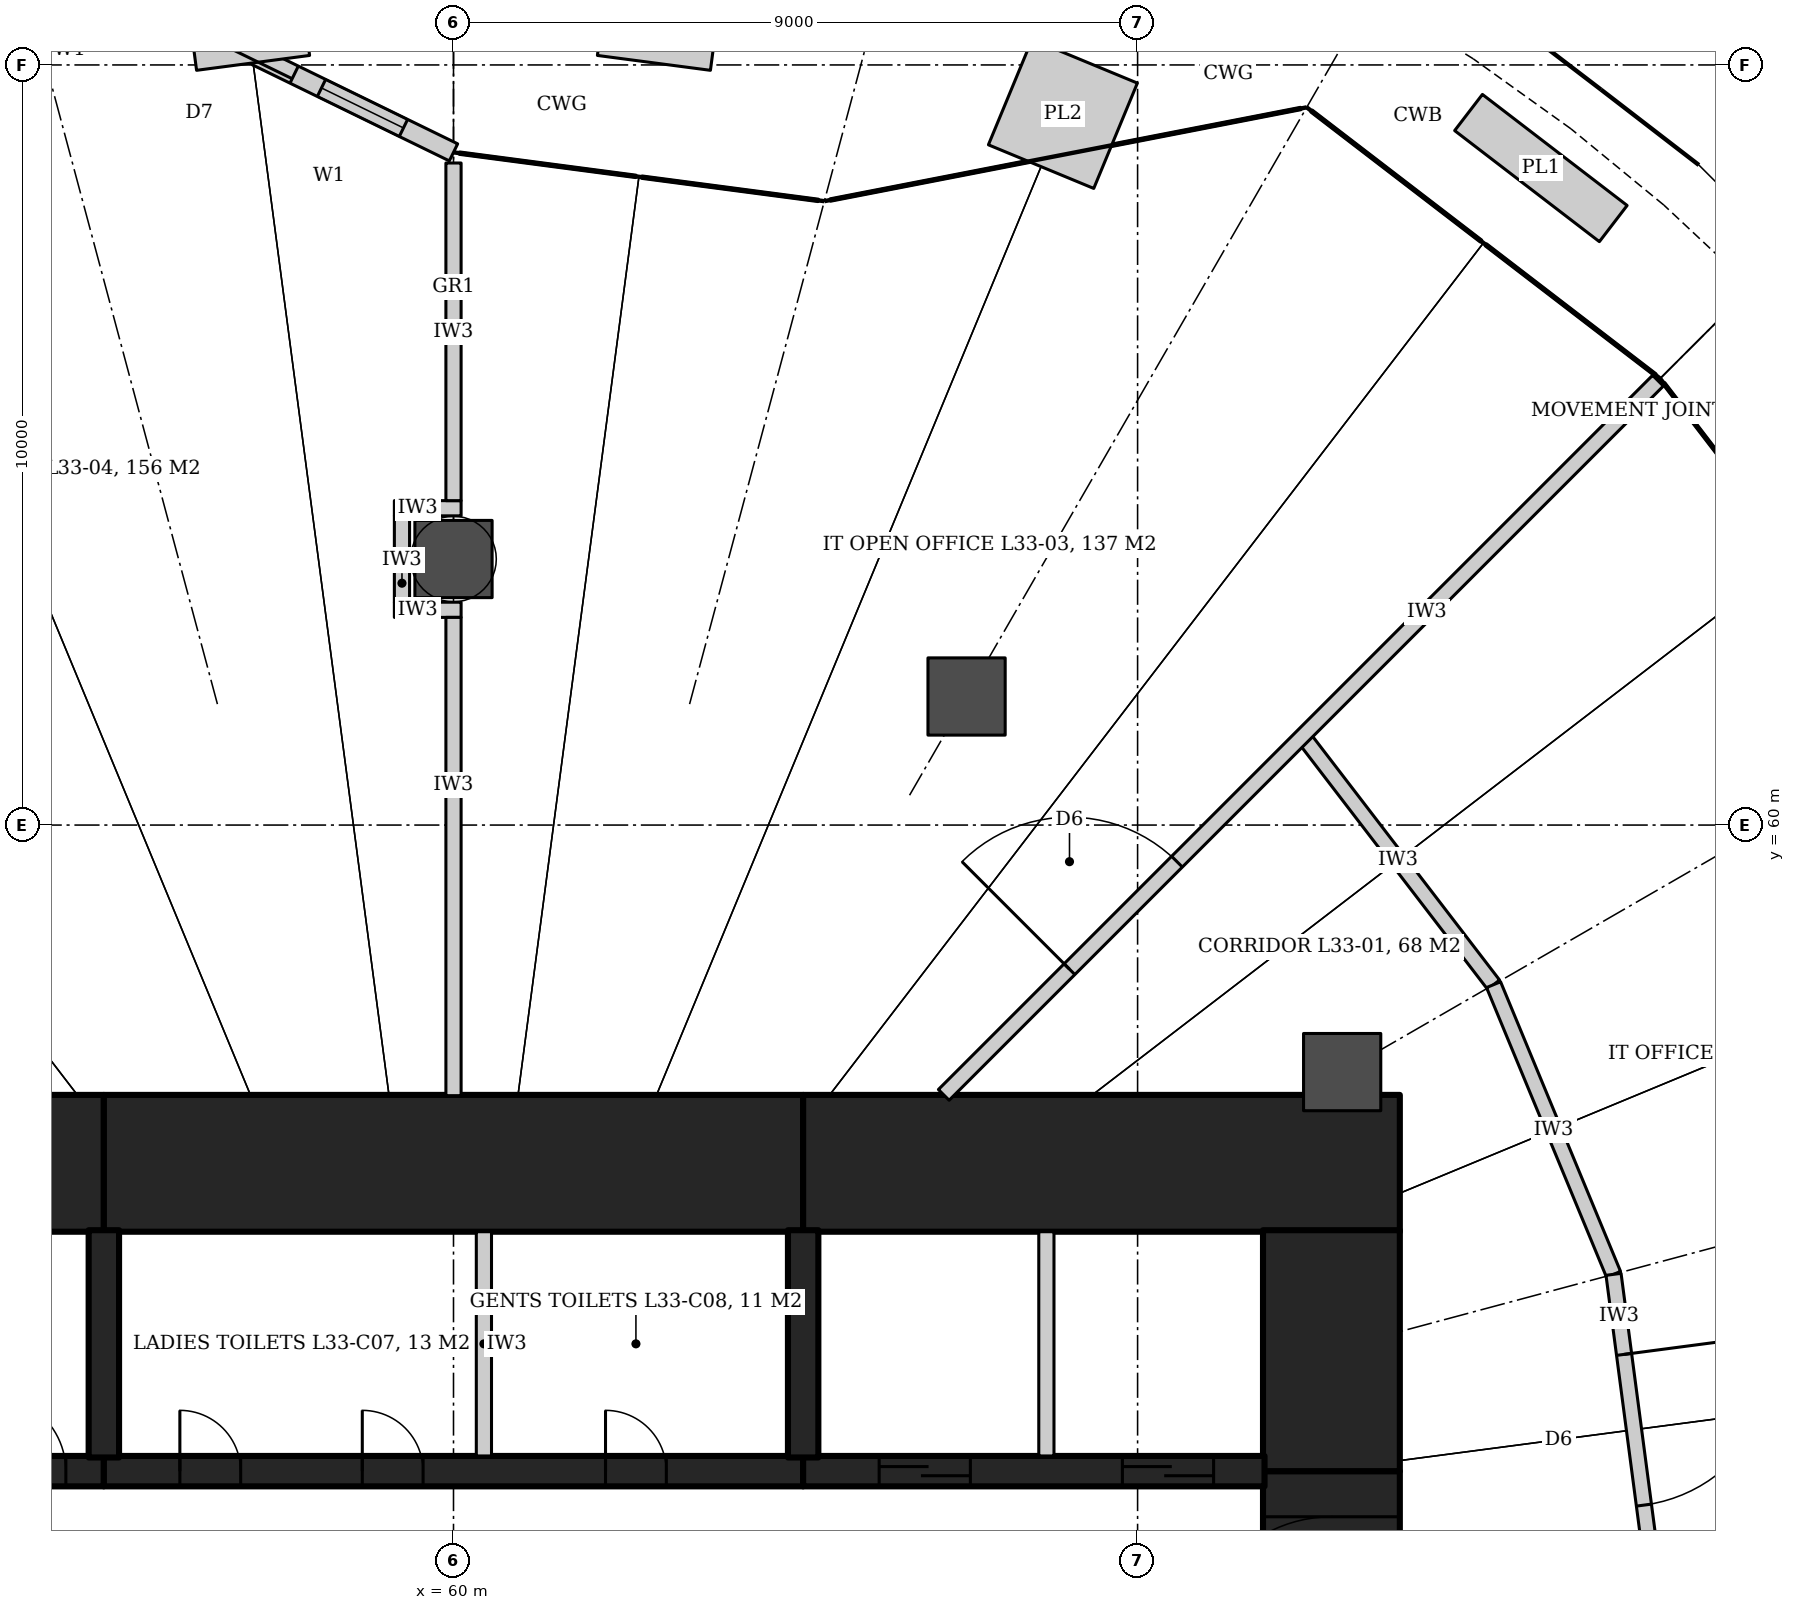
"""IFC4 building model, lengths in metres.
Left out: names, types, materials, properties, quantities, classifications, styles, units other than length and angle.
Written with IfcOpenShell. Run it as: python <this file> out.ifc"""

import sys

from ifc_helpers import new_model, si_unit, direction, frame, frame_2d, origin, origin_2d, place, context, subcontext, project, spatial, rectangle, hollow_circle, extrude, element, fill, save


model = new_model("IFC4")
c1 = context("Model", 3, precision=1e-05, world=origin(), true_north=direction((0.0, 1.0)))
c2 = subcontext(c1, "Body", "Model", "MODEL_VIEW")
j1 = project(units=[si_unit("LENGTHUNIT", "METRE"), si_unit("PLANEANGLEUNIT", "RADIAN")], contexts=[c1])
p1 = place(None, origin())
s1 = spatial("IfcSite", under=j1, at=p1, CompositionType="ELEMENT")
p2 = place(p1, origin())
s2 = spatial("IfcBuilding", under=s1, at=p2, CompositionType="ELEMENT")
p3 = place(p2, frame((0.0, 0.0, 147.8)))
s3 = spatial("IfcBuildingStorey", under=s2, at=p3, CompositionType="ELEMENT", Elevation=147.8)
p4 = place(p3, frame((47.55, 55.55, 0.0), z_axis=(0.0, 0.0, 1.0), x_axis=(1.0, 0.0, 0.0)))
e1 = element("IfcWall", 1, at=p4, inside=s3, PredefinedType="SHEAR", context=c2, shape_type="SweptSolid", body=[
    extrude(rectangle(XDim=7.85, YDim=1.8, at=frame_2d((3.925, 0.0))), origin(), (0.0, 0.0, 1.0), 4.2),
])
p5 = place(p3, frame((55.4, 55.55, 0.0), z_axis=(0.0, 0.0, 1.0), x_axis=(1.0, 0.0, 0.0)))
e2 = element("IfcWall", 2, at=p5, inside=s3, PredefinedType="SHEAR", context=c2, shape_type="SweptSolid", body=[
    extrude(rectangle(XDim=9.2, YDim=1.8, at=frame_2d((4.6, 0.0))), origin(), (0.0, 0.0, 1.0), 4.2),
])
p6 = place(p3, frame((64.6, 55.55, 0.0), z_axis=(0.0, 0.0, 1.0), x_axis=(1.0, 0.0, 0.0)))
e3 = element("IfcWall", 3, at=p6, inside=s3, PredefinedType="SHEAR", context=c2, shape_type="SweptSolid", body=[
    extrude(rectangle(XDim=7.85, YDim=1.8, at=frame_2d((3.925, 0.0))), origin(), (0.0, 0.0, 1.0), 4.2),
])
p7 = place(p3, frame((71.55, 48.5, 0.0), z_axis=(0.0, 0.0, 1.0), x_axis=(0.0, 1.0, 0.0)))
e4 = element("IfcWall", 4, at=p7, inside=s3, PredefinedType="SHEAR", context=c2, shape_type="SweptSolid", body=[
    extrude(rectangle(XDim=3.0, YDim=1.8, at=frame_2d((1.5, 0.0))), origin(), (0.0, 0.0, 1.0), 4.2),
])
p8 = place(p7, frame((0.6, 0.0, 0.0)))
e5 = element("IfcOpeningElement", 5, at=p8, cuts=e4, PredefinedType="OPENING", context=c2, shape_type="SweptSolid", body=[
    extrude(rectangle(XDim=1.8, YDim=2.1, at=frame_2d((0.9, 1.05))), frame((0.0, 0.91, 0.0), z_axis=(0.0, -1.0, 0.0), x_axis=(1.0, 0.0, 0.0)), (0.0, 0.0, 1.0), 1.82),
])
p9 = place(p3, frame((71.55, 51.5, 0.0), z_axis=(0.0, 0.0, 1.0), x_axis=(0.0, 1.0, 0.0)))
e6 = element("IfcWall", 6, at=p9, inside=s3, PredefinedType="SHEAR", context=c2, shape_type="SweptSolid", body=[
    extrude(rectangle(XDim=3.17, YDim=1.8, at=frame_2d((1.585, 0.0))), origin(), (0.0, 0.0, 1.0), 4.2),
])
p10 = place(p3, frame((49.33, 51.5, 0.0), z_axis=(0.0, 0.0, 1.0), x_axis=(1.0, 0.0, 0.0)))
e7 = element("IfcWall", 7, at=p10, inside=s3, PredefinedType="SHEAR", context=c2, shape_type="SweptSolid", body=[
    extrude(rectangle(XDim=6.07, YDim=0.4, at=frame_2d((3.035, 0.0))), origin(), (0.0, 0.0, 1.0), 4.2),
])
p11 = place(p10, frame((4.57, 0.0, 0.0)))
e8 = element("IfcOpeningElement", 8, at=p11, cuts=e7, PredefinedType="OPENING", context=c2, shape_type="SweptSolid", body=[
    extrude(rectangle(XDim=1.0, YDim=2.1, at=frame_2d((0.5, 1.05))), frame((0.0, 0.21, 0.0), z_axis=(0.0, -1.0, 0.0), x_axis=(1.0, 0.0, 0.0)), (0.0, 0.0, 1.0), 0.42),
])
p12 = place(p3, frame((55.4, 51.5, 0.0), z_axis=(0.0, 0.0, 1.0), x_axis=(1.0, 0.0, 0.0)))
e9 = element("IfcWall", 9, at=p12, inside=s3, PredefinedType="SHEAR", context=c2, shape_type="SweptSolid", body=[
    extrude(rectangle(XDim=9.2, YDim=0.4, at=frame_2d((4.6, 0.0))), origin(), (0.0, 0.0, 1.0), 4.2),
])
p13 = place(p12, frame((1.0, 0.0, 0.0)))
e10 = element("IfcOpeningElement", 10, at=p13, cuts=e9, PredefinedType="OPENING", context=c2, shape_type="SweptSolid", body=[
    extrude(rectangle(XDim=0.8, YDim=2.1, at=frame_2d((0.4, 1.05))), frame((0.0, 0.21, 0.0), z_axis=(0.0, -1.0, 0.0), x_axis=(1.0, 0.0, 0.0)), (0.0, 0.0, 1.0), 0.42),
])
p14 = place(p12, frame((3.4, 0.0, 0.0)))
e11 = element("IfcOpeningElement", 11, at=p14, cuts=e9, PredefinedType="OPENING", context=c2, shape_type="SweptSolid", body=[
    extrude(rectangle(XDim=0.8, YDim=2.1, at=frame_2d((0.4, 1.05))), frame((0.0, 0.21, 0.0), z_axis=(0.0, -1.0, 0.0), x_axis=(1.0, 0.0, 0.0)), (0.0, 0.0, 1.0), 0.42),
])
p15 = place(p12, frame((6.6, 0.0, 0.0)))
e12 = element("IfcOpeningElement", 12, at=p15, cuts=e9, PredefinedType="OPENING", context=c2, shape_type="SweptSolid", body=[
    extrude(rectangle(XDim=0.8, YDim=2.1, at=frame_2d((0.4, 1.05))), frame((0.0, 0.21, 0.0), z_axis=(0.0, -1.0, 0.0), x_axis=(1.0, 0.0, 0.0)), (0.0, 0.0, 1.0), 0.42),
])
p16 = place(p3, frame((64.6, 51.5, 0.0), z_axis=(0.0, 0.0, 1.0), x_axis=(1.0, 0.0, 0.0)))
e13 = element("IfcWall", 13, at=p16, inside=s3, PredefinedType="SHEAR", context=c2, shape_type="SweptSolid", body=[
    extrude(rectangle(XDim=6.07, YDim=0.4, at=frame_2d((3.035, 0.0))), origin(), (0.0, 0.0, 1.0), 4.2),
])
p17 = place(p16, frame((1.0, 0.0, 0.0)))
e14 = element("IfcOpeningElement", 14, at=p17, cuts=e13, PredefinedType="OPENING", context=c2, shape_type="SweptSolid", body=[
    extrude(rectangle(XDim=1.2, YDim=2.1, at=frame_2d((0.6, 1.05))), frame((0.0, 0.21, 0.0), z_axis=(0.0, -1.0, 0.0), x_axis=(1.0, 0.0, 0.0)), (0.0, 0.0, 1.0), 0.42),
])
p18 = place(p16, frame((4.2, 0.0, 0.0)))
e15 = element("IfcOpeningElement", 15, at=p18, cuts=e13, PredefinedType="OPENING", context=c2, shape_type="SweptSolid", body=[
    extrude(rectangle(XDim=1.2, YDim=2.1, at=frame_2d((0.6, 1.05))), frame((0.0, 0.21, 0.0), z_axis=(0.0, -1.0, 0.0), x_axis=(1.0, 0.0, 0.0)), (0.0, 0.0, 1.0), 0.42),
])
for number, where, z_axis, x_axis in (
    (16, (55.4, 51.68, 0.0), (0.0, 0.0, 1.0), (0.0, 1.0, 0.0)),
    (17, (64.6, 51.68, 0.0), (0.0, 0.0, 1.0), (0.0, 1.0, 0.0)),
):
    element("IfcWall", number, at=place(p3, frame(where, z_axis=z_axis, x_axis=x_axis)), inside=s3, PredefinedType="SHEAR", context=c2, shape_type="SweptSolid", body=[
        extrude(rectangle(XDim=2.99, YDim=0.4, at=frame_2d((1.495, 0.0))), origin(), (0.0, 0.0, 1.0), 4.2),
    ])
for number, where, z_axis, x_axis in (
    (18, (71.691, 56.75, 0.0), (0.0, 0.0, 1.0), (1.0, 0.0, 0.0)),
    (19, (66.75, 61.691, 0.0), (0.0, 0.0, 1.0), (1.0, 0.0, 0.0)),
    (20, (60.0, 63.5, 0.0), (0.0, 0.0, 1.0), (1.0, 0.0, 0.0)),
):
    element("IfcColumn", number, at=place(p3, frame(where, z_axis=z_axis, x_axis=x_axis)), inside=s3, PredefinedType="COLUMN", context=c2, shape_type="SweptSolid", body=[
        extrude(hollow_circle(Radius=0.508, WallThickness=0.05, at=origin_2d()), origin(), (0.0, 0.0, 1.0), 4.2),
    ])
p19 = place(p3, frame((71.172, 61.172, 0.0), z_axis=(0.0, 0.0, 1.0), x_axis=(0.608714823874, -0.793389099494, 0.0)))
e21 = element("IfcWall", 21, at=p19, inside=s3, PredefinedType="PARTITIONING", context=c2, shape_type="SweptSolid", body=[
    extrude(rectangle(XDim=4.125, YDim=0.2, at=frame_2d((2.062, 0.0))), origin(), (0.0, 0.0, 1.0), 3.04),
])
p20 = place(p3, frame((73.683, 57.9, 0.0), z_axis=(0.0, 0.0, 1.0), x_axis=(0.382731667114, -0.923859551549, 0.0)))
e22 = element("IfcWall", 22, at=p20, inside=s3, PredefinedType="PARTITIONING", context=c2, shape_type="SweptSolid", body=[
    extrude(rectangle(XDim=4.125, YDim=0.2, at=frame_2d((2.062, 0.0))), origin(), (0.0, 0.0, 1.0), 3.04),
])
p21 = place(p3, frame((75.262, 54.089, 0.0), z_axis=(0.0, 0.0, 1.0), x_axis=(0.130515758099, -0.991446234996, 0.0)))
e23 = element("IfcWall", 23, at=p21, inside=s3, PredefinedType="PARTITIONING", context=c2, shape_type="SweptSolid", body=[
    extrude(rectangle(XDim=4.125, YDim=0.2, at=frame_2d((2.062, 0.0))), origin(), (0.0, 0.0, 1.0), 3.04),
])
p22 = place(p21, frame((1.062, 0.0, 0.0)))
e24 = element("IfcOpeningElement", 24, at=p22, cuts=e23, PredefinedType="OPENING", context=c2, shape_type="SweptSolid", body=[
    extrude(rectangle(XDim=2.0, YDim=2.1, at=frame_2d((1.0, 1.05))), frame((0.0, 0.11, 0.0), z_axis=(0.0, -1.0, 0.0), x_axis=(1.0, 0.0, 0.0)), (0.0, 0.0, 1.0), 0.22),
])
p23 = place(p3, frame((66.45, 56.45, 0.0), z_axis=(0.0, 0.0, 1.0), x_axis=(0.707106781187, 0.707106781187, 0.0)))
e25 = element("IfcWall", 25, at=p23, inside=s3, PredefinedType="PARTITIONING", context=c2, shape_type="SweptSolid", body=[
    extrude(rectangle(XDim=13.288, YDim=0.2, at=frame_2d((6.644, 0.0))), origin(), (0.0, 0.0, 1.0), 3.02),
])
p24 = place(p23, frame((2.339, 0.0, 0.0)))
e26 = element("IfcOpeningElement", 26, at=p24, cuts=e25, PredefinedType="OPENING", context=c2, shape_type="SweptSolid", body=[
    extrude(rectangle(XDim=2.0, YDim=2.1, at=frame_2d((1.0, 1.05))), frame((0.0, 0.11, 0.0), z_axis=(0.0, -1.0, 0.0), x_axis=(1.0, 0.0, 0.0)), (0.0, 0.0, 1.0), 0.22),
])
for number, where, z_axis, x_axis in (
    (27, (60.1, 62.832, 0.0), (0.0, 0.0, 1.0), (-1.0, 0.0, 0.0)),
    (28, (60.1, 64.168, 0.0), (0.0, 0.0, 1.0), (-1.0, 0.0, 0.0)),
):
    element("IfcWall", number, at=place(p3, frame(where, z_axis=z_axis, x_axis=x_axis)), inside=s3, PredefinedType="PARTITIONING", context=c2, shape_type="SweptSolid", body=[
        extrude(rectangle(XDim=0.878, YDim=0.2, at=frame_2d((0.439, 0.0))), origin(), (0.0, 0.0, 1.0), 3.02),
    ])
p25 = place(p3, frame((59.322, 62.932, 0.0), z_axis=(0.0, 0.0, 1.0), x_axis=(0.0, 1.0, 0.0)))
e29 = element("IfcWall", 29, at=p25, inside=s3, PredefinedType="PARTITIONING", context=c2, shape_type="SweptSolid", body=[
    extrude(rectangle(XDim=1.136, YDim=0.2, at=frame_2d((0.568, 0.0))), origin(), (0.0, 0.0, 1.0), 3.02),
])
p26 = place(p3, frame((60.0, 56.44, 0.0), z_axis=(0.0, 0.0, 1.0), x_axis=(0.0, 1.0, 0.0)))
e30 = element("IfcWall", 30, at=p26, inside=s3, PredefinedType="PARTITIONING", context=c2, shape_type="SweptSolid", body=[
    extrude(rectangle(XDim=6.292, YDim=0.2, at=frame_2d((3.146, 0.0))), origin(), (0.0, 0.0, 1.0), 3.04),
])
p27 = place(p3, frame((60.0, 64.268, 0.0), z_axis=(0.0, 0.0, 1.0), x_axis=(0.0, 1.0, 0.0)))
e31 = element("IfcWall", 31, at=p27, inside=s3, PredefinedType="PARTITIONING", context=c2, shape_type="SweptSolid", body=[
    extrude(rectangle(XDim=4.442, YDim=0.2, at=frame_2d((2.221, 0.0))), origin(), (0.0, 0.0, 1.0), 3.04),
])
p28 = place(p3, frame((60.0, 68.85, 0.0), z_axis=(0.0, 0.0, 1.0), x_axis=(-0.898735054264, 0.438492077736, 0.0)))
e32 = element("IfcWall", 32, at=p28, inside=s3, PredefinedType="SOLIDWALL", context=c2, shape_type="SweptSolid", body=[
    extrude(rectangle(XDim=6.465, YDim=0.25, at=frame_2d((3.233, 0.0))), origin(), (0.0, 0.0, 1.0), 4.04),
])
p29 = place(p28, frame((2.333, 0.0, 0.0)))
e33 = element("IfcOpeningElement", 33, at=p29, cuts=e32, PredefinedType="OPENING", context=c2, shape_type="SweptSolid", body=[
    extrude(rectangle(XDim=1.8, YDim=2.4, at=frame_2d((0.9, 1.2))), frame((0.0, 0.135, 0.0), z_axis=(0.0, -1.0, 0.0), x_axis=(1.0, 0.0, 0.0)), (0.0, 0.0, 1.0), 0.27),
])
p30 = place(p28, frame((0.733, 0.0, 0.0)))
e34 = element("IfcOpeningElement", 34, at=p30, cuts=e32, PredefinedType="OPENING", context=c2, shape_type="SweptSolid", body=[
    extrude(rectangle(XDim=1.2, YDim=2.4, at=frame_2d((0.6, 1.2))), frame((0.0, 0.135, 0.0), z_axis=(0.0, -1.0, 0.0), x_axis=(1.0, 0.0, 0.0)), (0.0, 0.0, 1.0), 0.27),
])
p31 = place(p28, frame((4.533, 0.0, 0.0)))
e35 = element("IfcOpeningElement", 35, at=p31, cuts=e32, PredefinedType="OPENING", context=c2, shape_type="SweptSolid", body=[
    extrude(rectangle(XDim=1.2, YDim=2.4, at=frame_2d((0.6, 1.2))), frame((0.0, 0.135, 0.0), z_axis=(0.0, -1.0, 0.0), x_axis=(1.0, 0.0, 0.0)), (0.0, 0.0, 1.0), 0.27),
])
p32 = place(p3, frame((67.8, 51.7, 0.0), z_axis=(0.0, 0.0, 1.0), x_axis=(0.0, 1.0, 0.0)))
e36 = element("IfcWall", 36, at=p32, inside=s3, PredefinedType="PARTITIONING", context=c2, shape_type="SweptSolid", body=[
    extrude(rectangle(XDim=2.95, YDim=0.2, at=frame_2d((1.475, 0.0))), origin(), (0.0, 0.0, 1.0), 4.2),
])
p33 = place(p3, frame((60.4, 51.7, 0.0), z_axis=(0.0, 0.0, 1.0), x_axis=(0.0, 1.0, 0.0)))
e37 = element("IfcWall", 37, at=p33, inside=s3, PredefinedType="PARTITIONING", context=c2, shape_type="SweptSolid", body=[
    extrude(rectangle(XDim=2.95, YDim=0.2, at=frame_2d((1.475, 0.0))), origin(), (0.0, 0.0, 1.0), 4.04),
])
p34 = place(p22, origin())
e38 = element("IfcDoor", 38, at=p34, inside=s3, OperationType="DOUBLE_DOOR_DOUBLE_SWING", PredefinedType="DOOR", context=c2, shape_type="SweptSolid", body=[
    extrude(rectangle(XDim=2.0, YDim=2.1, at=frame_2d((1.0, 1.05))), frame((0.0, 0.025, 0.0), z_axis=(0.0, -1.0, 0.0), x_axis=(1.0, 0.0, 0.0)), (0.0, 0.0, 1.0), 0.05),
])
fill(e24, e38)
p35 = place(p24, origin())
e39 = element("IfcDoor", 39, at=p35, inside=s3, OperationType="DOUBLE_DOOR_DOUBLE_SWING", PredefinedType="DOOR", context=c2, shape_type="SweptSolid", body=[
    extrude(rectangle(XDim=2.0, YDim=2.1, at=frame_2d((1.0, 1.05))), frame((0.0, 0.025, 0.0), z_axis=(0.0, -1.0, 0.0), x_axis=(1.0, 0.0, 0.0)), (0.0, 0.0, 1.0), 0.05),
])
fill(e26, e39)
p36 = place(p29, origin())
e40 = element("IfcDoor", 40, at=p36, inside=s3, OperationType="DOUBLE_DOOR_SLIDING", PredefinedType="DOOR", context=c2, shape_type="SweptSolid", body=[
    extrude(rectangle(XDim=1.8, YDim=2.4, at=frame_2d((0.9, 1.2))), frame((0.0, 0.025, 0.0), z_axis=(0.0, -1.0, 0.0), x_axis=(1.0, 0.0, 0.0)), (0.0, 0.0, 1.0), 0.05),
])
fill(e33, e40)
p37 = place(p30, origin())
e41 = element("IfcWindow", 41, at=p37, inside=s3, PartitioningType="SINGLE_PANEL", PredefinedType="WINDOW", context=c2, shape_type="SweptSolid", body=[
    extrude(rectangle(XDim=1.2, YDim=2.4, at=frame_2d((0.6, 1.2))), frame((0.0, 0.03, 0.0), z_axis=(0.0, -1.0, 0.0), x_axis=(1.0, 0.0, 0.0)), (0.0, 0.0, 1.0), 0.06),
])
fill(e34, e41)
p38 = place(p11, origin())
e42 = element("IfcDoor", 42, at=p38, inside=s3, OperationType="SINGLE_SWING_LEFT", PredefinedType="DOOR", context=c2, shape_type="SweptSolid", body=[
    extrude(rectangle(XDim=1.0, YDim=2.1, at=frame_2d((0.5, 1.05))), frame((0.0, 0.025, 0.0), z_axis=(0.0, -1.0, 0.0), x_axis=(1.0, 0.0, 0.0)), (0.0, 0.0, 1.0), 0.05),
])
fill(e8, e42)
p39 = place(p17, origin())
e43 = element("IfcDoor", 43, at=p39, inside=s3, OperationType="SLIDING_TO_LEFT", PredefinedType="DOOR", context=c2, shape_type="SweptSolid", body=[
    extrude(rectangle(XDim=1.2, YDim=2.1, at=frame_2d((0.6, 1.05))), frame((0.0, 0.025, 0.0), z_axis=(0.0, -1.0, 0.0), x_axis=(1.0, 0.0, 0.0)), (0.0, 0.0, 1.0), 0.05),
])
fill(e14, e43)
p40 = place(p18, origin())
e44 = element("IfcDoor", 44, at=p40, inside=s3, OperationType="SLIDING_TO_LEFT", PredefinedType="DOOR", context=c2, shape_type="SweptSolid", body=[
    extrude(rectangle(XDim=1.2, YDim=2.1, at=frame_2d((0.6, 1.05))), frame((0.0, 0.025, 0.0), z_axis=(0.0, -1.0, 0.0), x_axis=(1.0, 0.0, 0.0)), (0.0, 0.0, 1.0), 0.05),
])
fill(e15, e44)
p41 = place(p8, origin())
e45 = element("IfcDoor", 45, at=p41, inside=s3, OperationType="DOUBLE_DOOR_DOUBLE_SWING", PredefinedType="DOOR", context=c2, shape_type="SweptSolid", body=[
    extrude(rectangle(XDim=1.8, YDim=2.1, at=frame_2d((0.9, 1.05))), frame((0.0, 0.025, 0.0), z_axis=(0.0, -1.0, 0.0), x_axis=(1.0, 0.0, 0.0)), (0.0, 0.0, 1.0), 0.05),
])
fill(e5, e45)
p42 = place(p13, origin())
e46 = element("IfcDoor", 46, at=p42, inside=s3, OperationType="SINGLE_SWING_LEFT", PredefinedType="DOOR", context=c2, shape_type="SweptSolid", body=[
    extrude(rectangle(XDim=0.8, YDim=2.1, at=frame_2d((0.4, 1.05))), frame((0.0, 0.025, 0.0), z_axis=(0.0, -1.0, 0.0), x_axis=(1.0, 0.0, 0.0)), (0.0, 0.0, 1.0), 0.05),
])
fill(e10, e46)
p43 = place(p14, origin())
e47 = element("IfcDoor", 47, at=p43, inside=s3, OperationType="SINGLE_SWING_LEFT", PredefinedType="DOOR", context=c2, shape_type="SweptSolid", body=[
    extrude(rectangle(XDim=0.8, YDim=2.1, at=frame_2d((0.4, 1.05))), frame((0.0, 0.025, 0.0), z_axis=(0.0, -1.0, 0.0), x_axis=(1.0, 0.0, 0.0)), (0.0, 0.0, 1.0), 0.05),
])
fill(e11, e47)
p44 = place(p15, origin())
e48 = element("IfcDoor", 48, at=p44, inside=s3, OperationType="SINGLE_SWING_LEFT", PredefinedType="DOOR", context=c2, shape_type="SweptSolid", body=[
    extrude(rectangle(XDim=0.8, YDim=2.1, at=frame_2d((0.4, 1.05))), frame((0.0, 0.025, 0.0), z_axis=(0.0, -1.0, 0.0), x_axis=(1.0, 0.0, 0.0)), (0.0, 0.0, 1.0), 0.05),
])
fill(e12, e48)
save(model, sys.argv[1])
